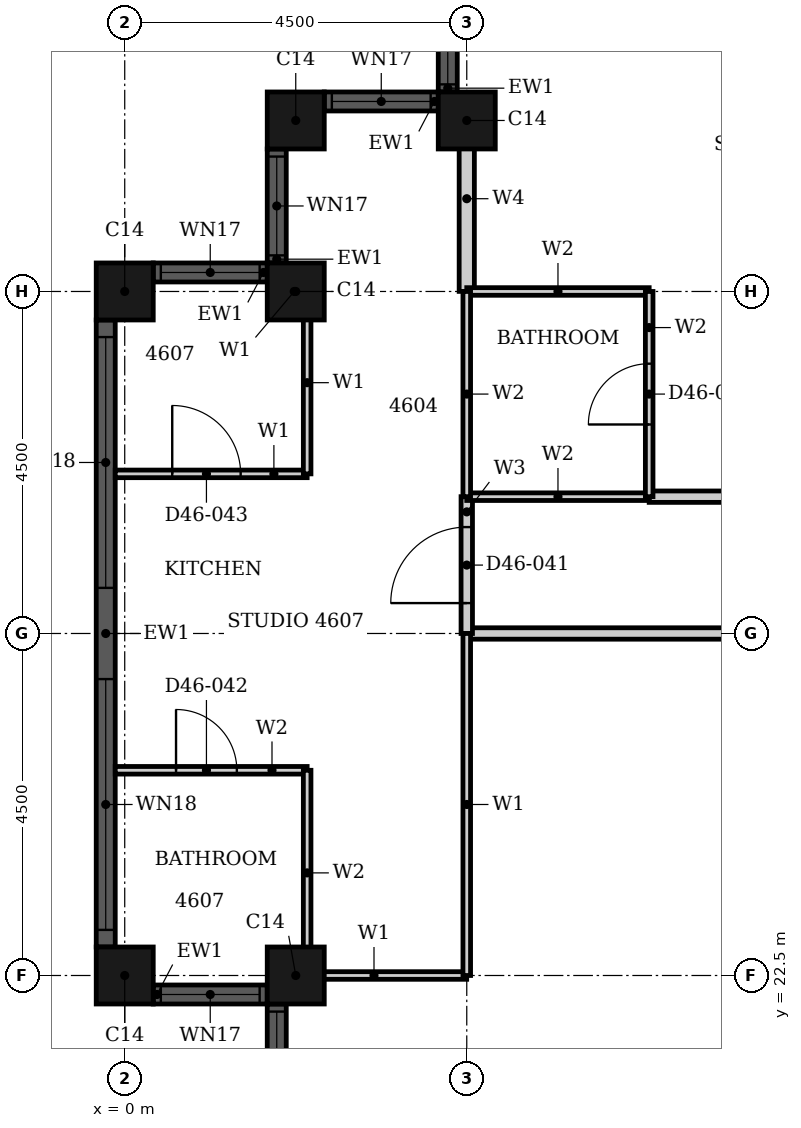
"""IFC4 building model, lengths in metres.
Left out: names, types, materials, properties, quantities, classifications, styles, units other than length and angle.
Written with IfcOpenShell. Run it as: python <this file> out.ifc"""

import sys

from ifc_helpers import new_model, si_unit, direction, frame, frame_2d, origin, origin_2d, place, context, subcontext, project, spatial, rectangle, hollow_rectangle, extrude, element, fill, save


model = new_model("IFC4")
c1 = context("Model", 3, precision=1e-05, world=origin(), true_north=direction((0.0, 1.0)))
c2 = subcontext(c1, "Body", "Model", "MODEL_VIEW")
j1 = project(units=[si_unit("LENGTHUNIT", "METRE"), si_unit("PLANEANGLEUNIT", "RADIAN")], contexts=[c1])
p1 = place(None, origin())
s1 = spatial("IfcSite", under=j1, at=p1, CompositionType="ELEMENT")
p2 = place(p1, origin())
s2 = spatial("IfcBuilding", under=s1, at=p2, CompositionType="ELEMENT")
p3 = place(p2, frame((0.0, 0.0, 183.9)))
s3 = spatial("IfcBuildingStorey", under=s2, at=p3, CompositionType="ELEMENT", Elevation=183.9)
for number, where, z_axis, x_axis in (
    (1, (4.5, 33.75, 0.0), (0.0, 0.0, 1.0), (1.0, 0.0, 0.0)),
    (2, (2.25, 33.75, 0.0), (0.0, 0.0, 1.0), (1.0, 0.0, 0.0)),
    (3, (2.25, 31.5, 0.0), (0.0, 0.0, 1.0), (1.0, 0.0, 0.0)),
    (4, (0.0, 31.5, 0.0), (0.0, 0.0, 1.0), (1.0, 0.0, 0.0)),
    (5, (0.0, 22.5, 0.0), (0.0, 0.0, 1.0), (1.0, 0.0, 0.0)),
    (6, (2.25, 22.5, 0.0), (0.0, 0.0, 1.0), (1.0, 0.0, 0.0)),
):
    element("IfcColumn", number, at=place(p3, frame(where, z_axis=z_axis, x_axis=x_axis)), inside=s3, PredefinedType="COLUMN", context=c2, shape_type="SweptSolid", body=[
        extrude(hollow_rectangle(XDim=0.75, YDim=0.75, WallThickness=0.024, at=origin_2d()), origin(), (0.0, 0.0, 1.0), 3.7),
    ])
p4 = place(p3, frame((4.25, 35.625, 0.0), z_axis=(0.0, 0.0, 1.0), x_axis=(0.0, -1.0, 0.0)))
e7 = element("IfcWall", 7, at=p4, inside=s3, PredefinedType="SOLIDWALL", context=c2, shape_type="SweptSolid", body=[
    extrude(rectangle(XDim=1.5, YDim=0.25, at=frame_2d((0.75, 0.0))), origin(), (0.0, 0.0, 1.0), 3.7),
])
p5 = place(p4, frame((0.1, 0.0, 0.9)))
e8 = element("IfcOpeningElement", 8, at=p5, cuts=e7, PredefinedType="OPENING", context=c2, shape_type="SweptSolid", body=[
    extrude(rectangle(XDim=1.3, YDim=1.95, at=frame_2d((0.65, 0.975))), frame((0.0, 0.135, 0.0), z_axis=(0.0, -1.0, 0.0), x_axis=(1.0, 0.0, 0.0)), (0.0, 0.0, 1.0), 0.27),
])
p6 = place(p3, frame((4.125, 34.0, 0.0), z_axis=(0.0, 0.0, 1.0), x_axis=(-1.0, 0.0, 0.0)))
e9 = element("IfcWall", 9, at=p6, inside=s3, PredefinedType="SOLIDWALL", context=c2, shape_type="SweptSolid", body=[
    extrude(rectangle(XDim=1.5, YDim=0.25, at=frame_2d((0.75, 0.0))), origin(), (0.0, 0.0, 1.0), 3.7),
])
p7 = place(p6, frame((0.1, 0.0, 0.9)))
e10 = element("IfcOpeningElement", 10, at=p7, cuts=e9, PredefinedType="OPENING", context=c2, shape_type="SweptSolid", body=[
    extrude(rectangle(XDim=1.3, YDim=1.95, at=frame_2d((0.65, 0.975))), frame((0.0, 0.135, 0.0), z_axis=(0.0, -1.0, 0.0), x_axis=(1.0, 0.0, 0.0)), (0.0, 0.0, 1.0), 0.27),
])
p8 = place(p3, frame((2.0, 33.375, 0.0), z_axis=(0.0, 0.0, 1.0), x_axis=(0.0, -1.0, 0.0)))
e11 = element("IfcWall", 11, at=p8, inside=s3, PredefinedType="SOLIDWALL", context=c2, shape_type="SweptSolid", body=[
    extrude(rectangle(XDim=1.5, YDim=0.25, at=frame_2d((0.75, 0.0))), origin(), (0.0, 0.0, 1.0), 3.7),
])
p9 = place(p8, frame((0.1, 0.0, 0.9)))
e12 = element("IfcOpeningElement", 12, at=p9, cuts=e11, PredefinedType="OPENING", context=c2, shape_type="SweptSolid", body=[
    extrude(rectangle(XDim=1.3, YDim=1.95, at=frame_2d((0.65, 0.975))), frame((0.0, 0.135, 0.0), z_axis=(0.0, -1.0, 0.0), x_axis=(1.0, 0.0, 0.0)), (0.0, 0.0, 1.0), 0.27),
])
p10 = place(p3, frame((1.875, 31.75, 0.0), z_axis=(0.0, 0.0, 1.0), x_axis=(-1.0, 0.0, 0.0)))
e13 = element("IfcWall", 13, at=p10, inside=s3, PredefinedType="SOLIDWALL", context=c2, shape_type="SweptSolid", body=[
    extrude(rectangle(XDim=1.5, YDim=0.25, at=frame_2d((0.75, 0.0))), origin(), (0.0, 0.0, 1.0), 3.7),
])
p11 = place(p10, frame((0.1, 0.0, 0.9)))
e14 = element("IfcOpeningElement", 14, at=p11, cuts=e13, PredefinedType="OPENING", context=c2, shape_type="SweptSolid", body=[
    extrude(rectangle(XDim=1.3, YDim=1.95, at=frame_2d((0.65, 0.975))), frame((0.0, 0.135, 0.0), z_axis=(0.0, -1.0, 0.0), x_axis=(1.0, 0.0, 0.0)), (0.0, 0.0, 1.0), 0.27),
])
p12 = place(p3, frame((-0.25, 31.125, 0.0), z_axis=(0.0, 0.0, 1.0), x_axis=(0.0, -1.0, 0.0)))
e15 = element("IfcWall", 15, at=p12, inside=s3, PredefinedType="SOLIDWALL", context=c2, shape_type="SweptSolid", body=[
    extrude(rectangle(XDim=8.25, YDim=0.25, at=frame_2d((4.125, 0.0))), origin(), (0.0, 0.0, 1.0), 3.7),
])
p13 = place(p12, frame((0.225, 0.0, 0.45)))
e16 = element("IfcOpeningElement", 16, at=p13, cuts=e15, PredefinedType="OPENING", context=c2, shape_type="SweptSolid", body=[
    extrude(rectangle(XDim=3.3, YDim=2.4, at=frame_2d((1.65, 1.2))), frame((0.0, 0.135, 0.0), z_axis=(0.0, -1.0, 0.0), x_axis=(1.0, 0.0, 0.0)), (0.0, 0.0, 1.0), 0.27),
])
p14 = place(p12, frame((4.725, 0.0, 0.45)))
e17 = element("IfcOpeningElement", 17, at=p14, cuts=e15, PredefinedType="OPENING", context=c2, shape_type="SweptSolid", body=[
    extrude(rectangle(XDim=3.3, YDim=2.4, at=frame_2d((1.65, 1.2))), frame((0.0, 0.135, 0.0), z_axis=(0.0, -1.0, 0.0), x_axis=(1.0, 0.0, 0.0)), (0.0, 0.0, 1.0), 0.27),
])
p15 = place(p3, frame((0.375, 22.25, 0.0), z_axis=(0.0, 0.0, 1.0), x_axis=(1.0, 0.0, 0.0)))
e18 = element("IfcWall", 18, at=p15, inside=s3, PredefinedType="SOLIDWALL", context=c2, shape_type="SweptSolid", body=[
    extrude(rectangle(XDim=1.5, YDim=0.25, at=frame_2d((0.75, 0.0))), origin(), (0.0, 0.0, 1.0), 3.7),
])
p16 = place(p15, frame((0.1, 0.0, 0.9)))
e19 = element("IfcOpeningElement", 19, at=p16, cuts=e18, PredefinedType="OPENING", context=c2, shape_type="SweptSolid", body=[
    extrude(rectangle(XDim=1.3, YDim=1.95, at=frame_2d((0.65, 0.975))), frame((0.0, 0.135, 0.0), z_axis=(0.0, -1.0, 0.0), x_axis=(1.0, 0.0, 0.0)), (0.0, 0.0, 1.0), 0.27),
])
p17 = place(p3, frame((2.0, 22.125, 0.0), z_axis=(0.0, 0.0, 1.0), x_axis=(0.0, -1.0, 0.0)))
e20 = element("IfcWall", 20, at=p17, inside=s3, PredefinedType="SOLIDWALL", context=c2, shape_type="SweptSolid", body=[
    extrude(rectangle(XDim=1.5, YDim=0.25, at=frame_2d((0.75, 0.0))), origin(), (0.0, 0.0, 1.0), 3.7),
])
p18 = place(p17, frame((0.1, 0.0, 0.9)))
e21 = element("IfcOpeningElement", 21, at=p18, cuts=e20, PredefinedType="OPENING", context=c2, shape_type="SweptSolid", body=[
    extrude(rectangle(XDim=1.3, YDim=1.95, at=frame_2d((0.65, 0.975))), frame((0.0, 0.135, 0.0), z_axis=(0.0, -1.0, 0.0), x_axis=(1.0, 0.0, 0.0)), (0.0, 0.0, 1.0), 0.27),
])
p19 = place(p3, frame((4.5, 27.0, 0.0), z_axis=(0.0, 0.0, 1.0), x_axis=(1.0, 0.0, 0.0)))
e22 = element("IfcWall", 22, at=p19, inside=s3, PredefinedType="PARTITIONING", context=c2, shape_type="SweptSolid", body=[
    extrude(rectangle(XDim=13.5, YDim=0.15, at=frame_2d((6.75, 0.0))), origin(), (0.0, 0.0, 1.0), 2.58),
])
p20 = place(p19, frame((5.35, 0.0, 0.0)))
e23 = element("IfcOpeningElement", 23, at=p20, cuts=e22, PredefinedType="OPENING", context=c2, shape_type="SweptSolid", body=[
    extrude(rectangle(XDim=1.0, YDim=2.1, at=frame_2d((0.5, 1.05))), frame((0.0, 0.085, 0.0), z_axis=(0.0, -1.0, 0.0), x_axis=(1.0, 0.0, 0.0)), (0.0, 0.0, 1.0), 0.17),
])
p21 = place(p3, frame((6.9, 28.8, 0.0), z_axis=(0.0, 0.0, 1.0), x_axis=(1.0, 0.0, 0.0)))
e24 = element("IfcWall", 24, at=p21, inside=s3, PredefinedType="PARTITIONING", context=c2, shape_type="SweptSolid", body=[
    extrude(rectangle(XDim=9.299, YDim=0.15, at=frame_2d((4.649, 0.0))), origin(), (0.0, 0.0, 1.0), 3.3),
])
p22 = place(p3, frame((4.5, 27.0, 0.0), z_axis=(0.0, 0.0, 1.0), x_axis=(0.0, 1.0, 0.0)))
e25 = element("IfcWall", 25, at=p22, inside=s3, PredefinedType="PARTITIONING", context=c2, shape_type="SweptSolid", body=[
    extrude(rectangle(XDim=1.8, YDim=0.15, at=frame_2d((0.9, 0.0))), origin(), (0.0, 0.0, 1.0), 3.3),
])
p23 = place(p22, frame((0.4, 0.0, 0.0)))
e26 = element("IfcOpeningElement", 26, at=p23, cuts=e25, PredefinedType="OPENING", context=c2, shape_type="SweptSolid", body=[
    extrude(rectangle(XDim=1.0, YDim=2.2, at=frame_2d((0.5, 1.1))), frame((0.0, 0.085, 0.0), z_axis=(0.0, -1.0, 0.0), x_axis=(1.0, 0.0, 0.0)), (0.0, 0.0, 1.0), 0.17),
])
p24 = place(p3, frame((2.06, 22.5, 0.0), z_axis=(0.0, 0.0, 1.0), x_axis=(1.0, 0.0, 0.0)))
e27 = element("IfcWall", 27, at=p24, inside=s3, PredefinedType="PARTITIONING", context=c2, shape_type="SweptSolid", body=[
    extrude(rectangle(XDim=2.439, YDim=0.1, at=frame_2d((1.219, 0.0))), origin(), (0.0, 0.0, 1.0), 2.58),
])
p25 = place(p3, frame((-0.125, 29.1, 0.0), z_axis=(0.0, 0.0, 1.0), x_axis=(1.0, 0.0, 0.0)))
e28 = element("IfcWall", 28, at=p25, inside=s3, PredefinedType="PARTITIONING", context=c2, shape_type="SweptSolid", body=[
    extrude(rectangle(XDim=2.525, YDim=0.1, at=frame_2d((1.262, 0.0))), origin(), (0.0, 0.0, 1.0), 3.3),
])
p26 = place(p25, frame((0.75, 0.0, 0.0)))
e29 = element("IfcOpeningElement", 29, at=p26, cuts=e28, PredefinedType="OPENING", context=c2, shape_type="SweptSolid", body=[
    extrude(rectangle(XDim=0.9, YDim=2.1, at=frame_2d((0.45, 1.05))), frame((0.0, 0.06, 0.0), z_axis=(0.0, -1.0, 0.0), x_axis=(1.0, 0.0, 0.0)), (0.0, 0.0, 1.0), 0.12),
])
p27 = place(p3, frame((2.06, 31.5, 0.0), z_axis=(0.0, 0.0, 1.0), x_axis=(1.0, 0.0, 0.0)))
e30 = element("IfcWall", 30, at=p27, inside=s3, PredefinedType="PARTITIONING", context=c2, shape_type="SweptSolid", body=[
    extrude(rectangle(XDim=0.34, YDim=0.1, at=frame_2d((0.17, 0.0))), origin(), (0.0, 0.0, 1.0), 3.3),
])
p28 = place(p3, frame((2.4, 29.1, 0.0), z_axis=(0.0, 0.0, 1.0), x_axis=(0.0, 1.0, 0.0)))
e31 = element("IfcWall", 31, at=p28, inside=s3, PredefinedType="PARTITIONING", context=c2, shape_type="SweptSolid", body=[
    extrude(rectangle(XDim=2.4, YDim=0.1, at=frame_2d((1.2, 0.0))), origin(), (0.0, 0.0, 1.0), 3.3),
])
p29 = place(p3, frame((4.5, 22.5, 0.0), z_axis=(0.0, 0.0, 1.0), x_axis=(0.0, 1.0, 0.0)))
e32 = element("IfcWall", 32, at=p29, inside=s3, PredefinedType="PARTITIONING", context=c2, shape_type="SweptSolid", body=[
    extrude(rectangle(XDim=4.5, YDim=0.1, at=frame_2d((2.25, 0.0))), origin(), (0.0, 0.0, 1.0), 3.3),
])
p30 = place(p3, frame((4.5, 31.501, 0.0), z_axis=(0.0, 0.0, 1.0), x_axis=(0.0, 1.0, 0.0)))
e33 = element("IfcWall", 33, at=p30, inside=s3, PredefinedType="PARTITIONING", context=c2, shape_type="SweptSolid", body=[
    extrude(rectangle(XDim=2.439, YDim=0.2, at=frame_2d((1.219, 0.0))), origin(), (0.0, 0.0, 1.0), 3.3),
])
p31 = place(p3, frame((-0.125, 25.2, 0.0), z_axis=(0.0, 0.0, 1.0), x_axis=(1.0, 0.0, 0.0)))
e34 = element("IfcWall", 34, at=p31, inside=s3, PredefinedType="PARTITIONING", context=c2, shape_type="SweptSolid", body=[
    extrude(rectangle(XDim=2.525, YDim=0.1, at=frame_2d((1.262, 0.0))), origin(), (0.0, 0.0, 1.0), 3.3),
])
p32 = place(p31, frame((0.8, 0.0, 0.0)))
e35 = element("IfcOpeningElement", 35, at=p32, cuts=e34, PredefinedType="OPENING", context=c2, shape_type="SweptSolid", body=[
    extrude(rectangle(XDim=0.8, YDim=2.1, at=frame_2d((0.4, 1.05))), frame((0.0, 0.06, 0.0), z_axis=(0.0, -1.0, 0.0), x_axis=(1.0, 0.0, 0.0)), (0.0, 0.0, 1.0), 0.12),
])
p33 = place(p3, frame((4.5, 28.8, 0.0), z_axis=(0.0, 0.0, 1.0), x_axis=(1.0, 0.0, 0.0)))
e36 = element("IfcWall", 36, at=p33, inside=s3, PredefinedType="PARTITIONING", context=c2, shape_type="SweptSolid", body=[
    extrude(rectangle(XDim=2.4, YDim=0.1, at=frame_2d((1.2, 0.0))), origin(), (0.0, 0.0, 1.0), 3.3),
])
p34 = place(p3, frame((4.5, 31.5, 0.0), z_axis=(0.0, 0.0, 1.0), x_axis=(1.0, 0.0, 0.0)))
e37 = element("IfcWall", 37, at=p34, inside=s3, PredefinedType="PARTITIONING", context=c2, shape_type="SweptSolid", body=[
    extrude(rectangle(XDim=2.4, YDim=0.1, at=frame_2d((1.2, 0.0))), origin(), (0.0, 0.0, 1.0), 2.58),
])
for number, where, z_axis, x_axis in (
    (38, (2.4, 22.5, 0.0), (0.0, 0.0, 1.0), (0.0, 1.0, 0.0)),
    (39, (4.5, 28.8, 0.0), (0.0, 0.0, 1.0), (0.0, 1.0, 0.0)),
):
    element("IfcWall", number, at=place(p3, frame(where, z_axis=z_axis, x_axis=x_axis)), inside=s3, PredefinedType="PARTITIONING", context=c2, shape_type="SweptSolid", body=[
        extrude(rectangle(XDim=2.7, YDim=0.1, at=frame_2d((1.35, 0.0))), origin(), (0.0, 0.0, 1.0), 3.3),
    ])
p35 = place(p3, frame((6.9, 28.8, 0.0), z_axis=(0.0, 0.0, 1.0), x_axis=(0.0, 1.0, 0.0)))
e40 = element("IfcWall", 40, at=p35, inside=s3, PredefinedType="PARTITIONING", context=c2, shape_type="SweptSolid", body=[
    extrude(rectangle(XDim=2.7, YDim=0.1, at=frame_2d((1.35, 0.0))), origin(), (0.0, 0.0, 1.0), 3.3),
])
p36 = place(p35, frame((0.95, 0.0, 0.0)))
e41 = element("IfcOpeningElement", 41, at=p36, cuts=e40, PredefinedType="OPENING", context=c2, shape_type="SweptSolid", body=[
    extrude(rectangle(XDim=0.8, YDim=2.1, at=frame_2d((0.4, 1.05))), frame((0.0, 0.06, 0.0), z_axis=(0.0, -1.0, 0.0), x_axis=(1.0, 0.0, 0.0)), (0.0, 0.0, 1.0), 0.12),
])
p37 = place(p5, origin())
e42 = element("IfcWindow", 42, at=p37, inside=s3, PartitioningType="SINGLE_PANEL", PredefinedType="WINDOW", context=c2, shape_type="SweptSolid", body=[
    extrude(rectangle(XDim=1.3, YDim=1.95, at=frame_2d((0.65, 0.975))), frame((0.0, 0.03, 0.0), z_axis=(0.0, -1.0, 0.0), x_axis=(1.0, 0.0, 0.0)), (0.0, 0.0, 1.0), 0.06),
])
fill(e8, e42)
p38 = place(p7, origin())
e43 = element("IfcWindow", 43, at=p38, inside=s3, PartitioningType="SINGLE_PANEL", PredefinedType="WINDOW", context=c2, shape_type="SweptSolid", body=[
    extrude(rectangle(XDim=1.3, YDim=1.95, at=frame_2d((0.65, 0.975))), frame((0.0, 0.03, 0.0), z_axis=(0.0, -1.0, 0.0), x_axis=(1.0, 0.0, 0.0)), (0.0, 0.0, 1.0), 0.06),
])
fill(e10, e43)
p39 = place(p9, origin())
e44 = element("IfcWindow", 44, at=p39, inside=s3, PartitioningType="SINGLE_PANEL", PredefinedType="WINDOW", context=c2, shape_type="SweptSolid", body=[
    extrude(rectangle(XDim=1.3, YDim=1.95, at=frame_2d((0.65, 0.975))), frame((0.0, 0.03, 0.0), z_axis=(0.0, -1.0, 0.0), x_axis=(1.0, 0.0, 0.0)), (0.0, 0.0, 1.0), 0.06),
])
fill(e12, e44)
p40 = place(p11, origin())
e45 = element("IfcWindow", 45, at=p40, inside=s3, PartitioningType="SINGLE_PANEL", PredefinedType="WINDOW", context=c2, shape_type="SweptSolid", body=[
    extrude(rectangle(XDim=1.3, YDim=1.95, at=frame_2d((0.65, 0.975))), frame((0.0, 0.03, 0.0), z_axis=(0.0, -1.0, 0.0), x_axis=(1.0, 0.0, 0.0)), (0.0, 0.0, 1.0), 0.06),
])
fill(e14, e45)
p41 = place(p13, origin())
e46 = element("IfcWindow", 46, at=p41, inside=s3, PartitioningType="SINGLE_PANEL", PredefinedType="WINDOW", context=c2, shape_type="SweptSolid", body=[
    extrude(rectangle(XDim=3.3, YDim=2.4, at=frame_2d((1.65, 1.2))), frame((0.0, 0.03, 0.0), z_axis=(0.0, -1.0, 0.0), x_axis=(1.0, 0.0, 0.0)), (0.0, 0.0, 1.0), 0.06),
])
fill(e16, e46)
p42 = place(p14, origin())
e47 = element("IfcWindow", 47, at=p42, inside=s3, PartitioningType="SINGLE_PANEL", PredefinedType="WINDOW", context=c2, shape_type="SweptSolid", body=[
    extrude(rectangle(XDim=3.3, YDim=2.4, at=frame_2d((1.65, 1.2))), frame((0.0, 0.03, 0.0), z_axis=(0.0, -1.0, 0.0), x_axis=(1.0, 0.0, 0.0)), (0.0, 0.0, 1.0), 0.06),
])
fill(e17, e47)
p43 = place(p16, origin())
e48 = element("IfcWindow", 48, at=p43, inside=s3, PartitioningType="SINGLE_PANEL", PredefinedType="WINDOW", context=c2, shape_type="SweptSolid", body=[
    extrude(rectangle(XDim=1.3, YDim=1.95, at=frame_2d((0.65, 0.975))), frame((0.0, 0.03, 0.0), z_axis=(0.0, -1.0, 0.0), x_axis=(1.0, 0.0, 0.0)), (0.0, 0.0, 1.0), 0.06),
])
fill(e19, e48)
p44 = place(p18, origin())
e49 = element("IfcWindow", 49, at=p44, inside=s3, PartitioningType="SINGLE_PANEL", PredefinedType="WINDOW", context=c2, shape_type="SweptSolid", body=[
    extrude(rectangle(XDim=1.3, YDim=1.95, at=frame_2d((0.65, 0.975))), frame((0.0, 0.03, 0.0), z_axis=(0.0, -1.0, 0.0), x_axis=(1.0, 0.0, 0.0)), (0.0, 0.0, 1.0), 0.06),
])
fill(e21, e49)
p45 = place(p36, origin())
e50 = element("IfcDoor", 50, at=p45, inside=s3, OperationType="SINGLE_SWING_LEFT", PredefinedType="DOOR", context=c2, shape_type="SweptSolid", body=[
    extrude(rectangle(XDim=0.8, YDim=2.1, at=frame_2d((0.4, 1.05))), frame((0.0, 0.025, 0.0), z_axis=(0.0, -1.0, 0.0), x_axis=(1.0, 0.0, 0.0)), (0.0, 0.0, 1.0), 0.05),
])
fill(e41, e50)
p46 = place(p23, origin())
e51 = element("IfcDoor", 51, at=p46, inside=s3, OperationType="SINGLE_SWING_RIGHT", PredefinedType="DOOR", context=c2, shape_type="SweptSolid", body=[
    extrude(rectangle(XDim=1.0, YDim=2.2, at=frame_2d((0.5, 1.1))), frame((0.0, 0.025, 0.0), z_axis=(0.0, -1.0, 0.0), x_axis=(1.0, 0.0, 0.0)), (0.0, 0.0, 1.0), 0.05),
])
fill(e26, e51)
p47 = place(p32, origin())
e52 = element("IfcDoor", 52, at=p47, inside=s3, OperationType="SINGLE_SWING_RIGHT", PredefinedType="DOOR", context=c2, shape_type="SweptSolid", body=[
    extrude(rectangle(XDim=0.8, YDim=2.1, at=frame_2d((0.4, 1.05))), frame((0.0, 0.025, 0.0), z_axis=(0.0, -1.0, 0.0), x_axis=(1.0, 0.0, 0.0)), (0.0, 0.0, 1.0), 0.05),
])
fill(e35, e52)
p48 = place(p26, origin())
e53 = element("IfcDoor", 53, at=p48, inside=s3, OperationType="SINGLE_SWING_RIGHT", PredefinedType="DOOR", context=c2, shape_type="SweptSolid", body=[
    extrude(rectangle(XDim=0.9, YDim=2.1, at=frame_2d((0.45, 1.05))), frame((0.0, 0.025, 0.0), z_axis=(0.0, -1.0, 0.0), x_axis=(1.0, 0.0, 0.0)), (0.0, 0.0, 1.0), 0.05),
])
fill(e29, e53)
save(model, sys.argv[1])
